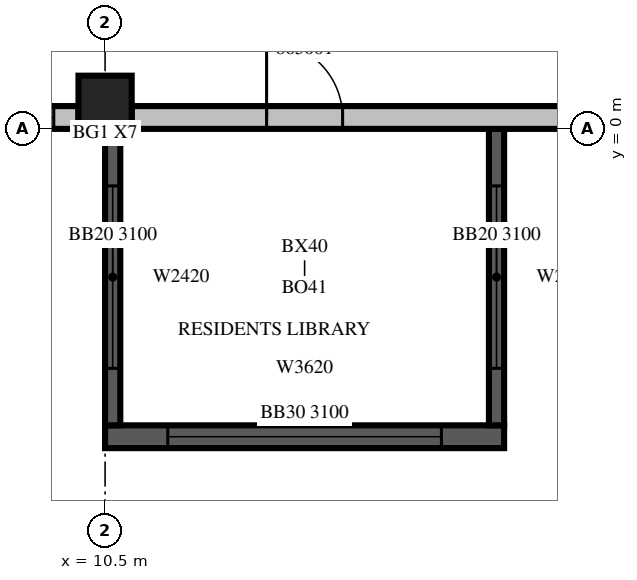
"""IFC4 building model, lengths in metres.
Left out: names, types, materials, properties, quantities, classifications, styles, units other than length and angle.
Written with IfcOpenShell. Run it as: python <this file> out.ifc"""

import sys

from ifc_helpers import new_model, si_unit, direction, frame, frame_2d, origin, origin_2d, place, context, subcontext, project, spatial, rectangle, extrude, source, transform, mapped, element, fill, save


model = new_model("IFC4")
c1 = context("Model", 3, precision=1e-05, world=origin(), true_north=direction((0.0, 1.0)))
c2 = subcontext(c1, "Body", "Model", "MODEL_VIEW")
j1 = project(units=[si_unit("LENGTHUNIT", "METRE"), si_unit("PLANEANGLEUNIT", "RADIAN")], contexts=[c1])
p1 = place(None, origin())
s1 = spatial("IfcSite", under=j1, at=p1, CompositionType="ELEMENT")
p2 = place(p1, origin())
s2 = spatial("IfcBuilding", under=s1, at=p2, CompositionType="ELEMENT")
p3 = place(p2, frame((0.0, 0.0, 288.0)))
s3 = spatial("IfcBuildingStorey", under=s2, at=p3, CompositionType="ELEMENT", Elevation=288.0)
m1 = source(origin(), c2, "Body", "SweptSolid", [
    extrude(rectangle(XDim=0.7, YDim=0.7, at=origin_2d()), origin(), (0.0, 0.0, 1.0), 3.5),
])
p4 = place(p3, frame((10.5, 0.35, 0.0), z_axis=(0.0, 0.0, 1.0), x_axis=(1.0, 0.0, 0.0)))
e1 = element("IfcColumn", 1, at=p4, inside=s3, PredefinedType="COLUMN", context=c2, shape_type="MappedRepresentation", body=[
    mapped(m1, transform((0.0, 0.0, 0.0), scale=1.0)),
])
p5 = place(p3, frame((10.5, -4.05, 0.0), z_axis=(0.0, 0.0, 1.0), x_axis=(1.0, 0.0, 0.0)))
e2 = element("IfcWall", 2, at=p5, inside=s3, PredefinedType="SOLIDWALL", context=c2, shape_type="SweptSolid", body=[
    extrude(rectangle(XDim=5.25, YDim=0.3, at=frame_2d((2.625, 0.0))), origin(), (0.0, 0.0, 1.0), 3.1),
])
m2 = source(origin(), c2, "Body", "SweptSolid", [
    extrude(rectangle(XDim=3.6, YDim=2.0, at=frame_2d((1.8, 1.0))), frame((0.0, 0.16, 0.0), z_axis=(0.0, -1.0, 0.0), x_axis=(1.0, 0.0, 0.0)), (0.0, 0.0, 1.0), 0.32),
])
p6 = place(p5, frame((0.825, 0.0, 0.6)))
e3 = element("IfcOpeningElement", 3, at=p6, cuts=e2, PredefinedType="OPENING", context=c2, shape_type="MappedRepresentation", body=[
    mapped(m2, transform((0.0, 0.0, 0.0), scale=1.0)),
])
p7 = place(p3, frame((10.6, 0.0, 0.0), z_axis=(0.0, 0.0, 1.0), x_axis=(0.0, -1.0, 0.0)))
e4 = element("IfcWall", 4, at=p7, inside=s3, PredefinedType="SOLIDWALL", context=c2, shape_type="SweptSolid", body=[
    extrude(rectangle(XDim=3.9, YDim=0.2, at=frame_2d((1.95, 0.0))), origin(), (0.0, 0.0, 1.0), 3.1),
])
m3 = source(origin(), c2, "Body", "SweptSolid", [
    extrude(rectangle(XDim=2.4, YDim=2.0, at=frame_2d((1.2, 1.0))), frame((0.0, 0.11, 0.0), z_axis=(0.0, -1.0, 0.0), x_axis=(1.0, 0.0, 0.0)), (0.0, 0.0, 1.0), 0.22),
])
p8 = place(p7, frame((0.75, 0.0, 0.6)))
e5 = element("IfcOpeningElement", 5, at=p8, cuts=e4, PredefinedType="OPENING", context=c2, shape_type="MappedRepresentation", body=[
    mapped(m3, transform((0.0, 0.0, 0.0), scale=1.0)),
])
m4 = source(origin(), c2, "Body", "SweptSolid", [
    extrude(rectangle(XDim=3.9, YDim=0.2, at=frame_2d((1.95, 0.0))), origin(), (0.0, 0.0, 1.0), 3.1),
])
p9 = place(p3, frame((15.65, 0.0, 0.0), z_axis=(0.0, 0.0, 1.0), x_axis=(0.0, -1.0, 0.0)))
e6 = element("IfcWall", 6, at=p9, inside=s3, PredefinedType="SOLIDWALL", context=c2, shape_type="MappedRepresentation", body=[
    mapped(m4, transform((0.0, 0.0, 0.0), scale=1.0)),
])
p10 = place(p9, frame((0.75, 0.0, 0.6)))
e7 = element("IfcOpeningElement", 7, at=p10, cuts=e6, PredefinedType="OPENING", context=c2, shape_type="MappedRepresentation", body=[
    mapped(m3, transform((0.0, 0.0, 0.0), scale=1.0)),
])
p11 = place(p3, frame((4.2, 0.15, 0.0), z_axis=(0.0, 0.0, 1.0), x_axis=(1.0, 0.0, 0.0)))
e8 = element("IfcWall", 8, at=p11, inside=s3, PredefinedType="STANDARD", context=c2, shape_type="SweptSolid", body=[
    extrude(rectangle(XDim=5.95, YDim=0.3, at=frame_2d((2.975, 0.0))), origin(), (0.0, 0.0, 1.0), 3.1),
])
m5 = source(origin(), c2, "Body", "SweptSolid", [
    extrude(rectangle(XDim=1.8, YDim=2.0, at=frame_2d((0.9, 1.0))), frame((0.0, 0.16, 0.0), z_axis=(0.0, -1.0, 0.0), x_axis=(1.0, 0.0, 0.0)), (0.0, 0.0, 1.0), 0.32),
])
p12 = place(p11, frame((0.675, 0.0, 0.6)))
e9 = element("IfcOpeningElement", 9, at=p12, cuts=e8, PredefinedType="OPENING", context=c2, shape_type="MappedRepresentation", body=[
    mapped(m5, transform((0.0, 0.0, 0.0), scale=1.0)),
])
p13 = place(p11, frame((3.825, 0.0, 0.6)))
e10 = element("IfcOpeningElement", 10, at=p13, cuts=e8, PredefinedType="OPENING", context=c2, shape_type="MappedRepresentation", body=[
    mapped(m5, transform((0.0, 0.0, 0.0), scale=1.0)),
])
m6 = source(origin(), c2, "Body", "SweptSolid", [
    extrude(rectangle(XDim=9.8, YDim=0.3, at=frame_2d((4.9, 0.0))), origin(), (0.0, 0.0, 1.0), 3.1),
])
p14 = place(p3, frame((10.85, 0.15, 0.0), z_axis=(0.0, 0.0, 1.0), x_axis=(1.0, 0.0, 0.0)))
e11 = element("IfcWall", 11, at=p14, inside=s3, PredefinedType="STANDARD", context=c2, shape_type="MappedRepresentation", body=[
    mapped(m6, transform((0.0, 0.0, 0.0), scale=1.0)),
])
p15 = place(p14, frame((5.725, 0.0, 0.6)))
e12 = element("IfcOpeningElement", 12, at=p15, cuts=e11, PredefinedType="OPENING", context=c2, shape_type="MappedRepresentation", body=[
    mapped(m2, transform((0.0, 0.0, 0.0), scale=1.0)),
])
m7 = source(origin(), c2, "Body", "SweptSolid", [
    extrude(rectangle(XDim=1.0, YDim=2.1, at=frame_2d((0.5, 1.05))), frame((0.0, 0.16, 0.0), z_axis=(0.0, -1.0, 0.0), x_axis=(1.0, 0.0, 0.0)), (0.0, 0.0, 1.0), 0.32),
])
p16 = place(p14, frame((1.775, 0.0, 0.0)))
e13 = element("IfcOpeningElement", 13, at=p16, cuts=e11, PredefinedType="OPENING", context=c2, shape_type="MappedRepresentation", body=[
    mapped(m7, transform((0.0, 0.0, 0.0), scale=1.0)),
])
m8 = source(origin(), c2, "Body", "SweptSolid", [
    extrude(rectangle(XDim=3.6, YDim=2.0, at=frame_2d((1.8, 1.0))), frame((0.0, 0.03, 0.0), z_axis=(0.0, -1.0, 0.0), x_axis=(1.0, 0.0, 0.0)), (0.0, 0.0, 1.0), 0.06),
])
p17 = place(p6, origin())
e14 = element("IfcWindow", 14, at=p17, inside=s3, PartitioningType="SINGLE_PANEL", PredefinedType="WINDOW", context=c2, shape_type="MappedRepresentation", body=[
    mapped(m8, transform((0.0, 0.0, 0.0), scale=1.0)),
])
fill(e3, e14)
m9 = source(origin(), c2, "Body", "SweptSolid", [
    extrude(rectangle(XDim=2.4, YDim=2.0, at=frame_2d((1.2, 1.0))), frame((0.0, 0.03, 0.0), z_axis=(0.0, -1.0, 0.0), x_axis=(1.0, 0.0, 0.0)), (0.0, 0.0, 1.0), 0.06),
])
p18 = place(p8, origin())
e15 = element("IfcWindow", 15, at=p18, inside=s3, PartitioningType="SINGLE_PANEL", PredefinedType="WINDOW", context=c2, shape_type="MappedRepresentation", body=[
    mapped(m9, transform((0.0, 0.0, 0.0), scale=1.0)),
])
fill(e5, e15)
p19 = place(p10, origin())
e16 = element("IfcWindow", 16, at=p19, inside=s3, PartitioningType="SINGLE_PANEL", PredefinedType="WINDOW", context=c2, shape_type="MappedRepresentation", body=[
    mapped(m9, transform((0.0, 0.0, 0.0), scale=1.0)),
])
fill(e7, e16)
m10 = source(origin(), c2, "Body", "SweptSolid", [
    extrude(rectangle(XDim=1.8, YDim=2.0, at=frame_2d((0.9, 1.0))), frame((0.0, 0.03, 0.0), z_axis=(0.0, -1.0, 0.0), x_axis=(1.0, 0.0, 0.0)), (0.0, 0.0, 1.0), 0.06),
])
p20 = place(p13, origin())
e17 = element("IfcWindow", 17, at=p20, inside=s3, PartitioningType="SINGLE_PANEL", PredefinedType="WINDOW", context=c2, shape_type="MappedRepresentation", body=[
    mapped(m10, transform((0.0, 0.0, 0.0), scale=1.0)),
])
fill(e10, e17)
m11 = source(origin(), c2, "Body", "SweptSolid", [
    extrude(rectangle(XDim=1.0, YDim=2.1, at=frame_2d((0.5, 1.05))), frame((0.0, 0.025, 0.0), z_axis=(0.0, -1.0, 0.0), x_axis=(1.0, 0.0, 0.0)), (0.0, 0.0, 1.0), 0.05),
])
p21 = place(p16, origin())
e18 = element("IfcDoor", 18, at=p21, inside=s3, OperationType="SINGLE_SWING_LEFT", PredefinedType="DOOR", context=c2, shape_type="MappedRepresentation", body=[
    mapped(m11, transform((0.0, 0.0, 0.0), scale=1.0)),
])
fill(e13, e18)
save(model, sys.argv[1])
